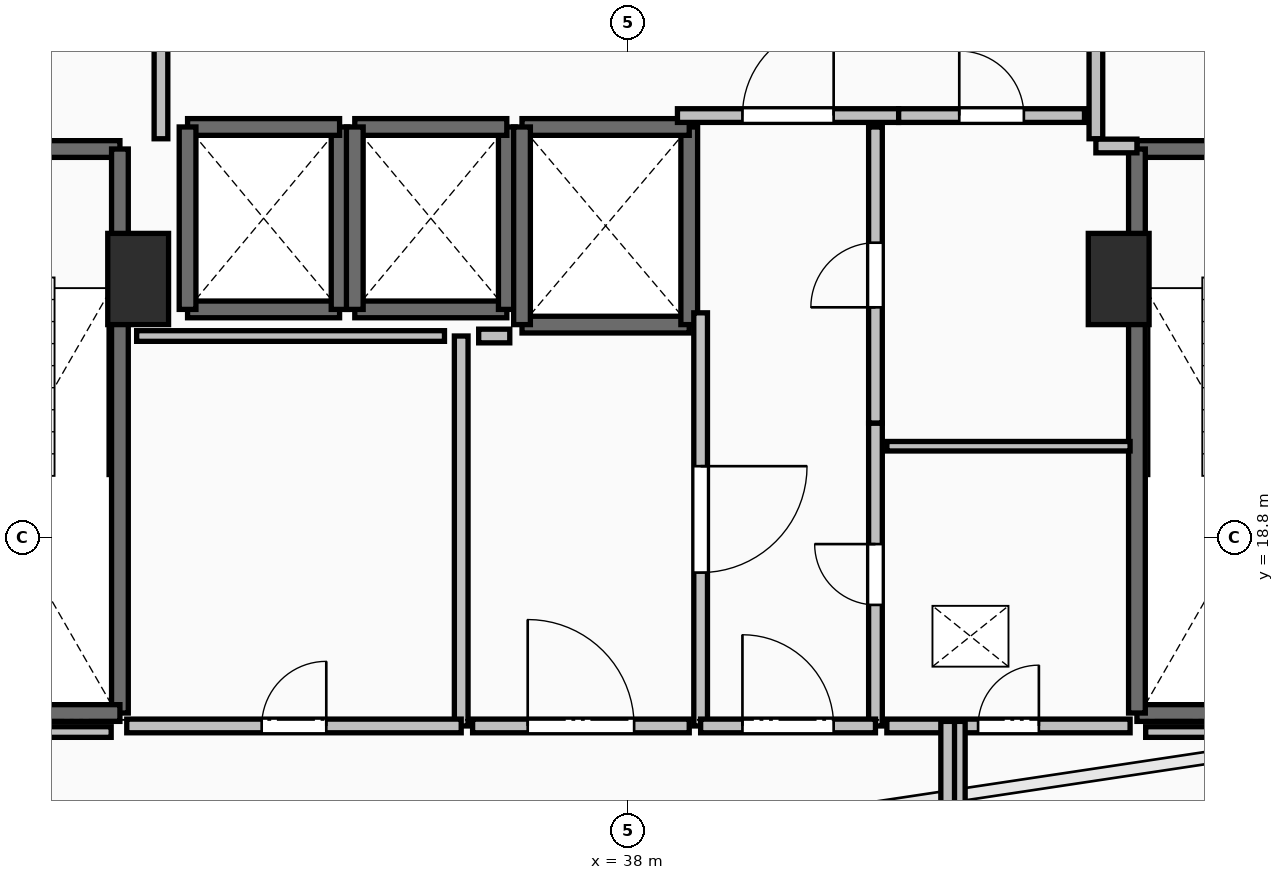
"""IFC4 building model, lengths in metres.
Left out: names, types, materials, properties, quantities, classifications, styles, units other than length and angle.
Written with IfcOpenShell. Run it as: python <this file> out.ifc"""

import sys

from ifc_helpers import new_model, si_unit, direction, frame, frame_2d, origin, origin_2d, place, context, subcontext, project, spatial, rectangle, extrude, element, fill, save


model = new_model("IFC4")
c1 = context("Model", 3, precision=1e-05, world=origin(), true_north=direction((0.0, 1.0)))
c2 = subcontext(c1, "Body", "Model", "MODEL_VIEW")
j1 = project(units=[si_unit("LENGTHUNIT", "METRE"), si_unit("PLANEANGLEUNIT", "RADIAN")], contexts=[c1])
p1 = place(None, origin())
s1 = spatial("IfcSite", under=j1, at=p1, CompositionType="ELEMENT")
p2 = place(p1, origin())
s2 = spatial("IfcBuilding", under=s1, at=p2, CompositionType="ELEMENT")
p3 = place(p2, frame((0.0, 0.0, 110.3)))
s3 = spatial("IfcBuildingStorey", under=s2, at=p3, CompositionType="ELEMENT", Elevation=110.3)
for number, where, z_axis, x_axis in (
    (1, (31.55, 22.2, 0.0), (0.0, 0.0, 1.0), (1.0, 0.0, 0.0)),
    (2, (44.45, 22.2, 0.0), (0.0, 0.0, 1.0), (1.0, 0.0, 0.0)),
):
    element("IfcColumn", number, at=place(p3, frame(where, z_axis=z_axis, x_axis=x_axis)), inside=s3, PredefinedType="PILASTER", context=c2, shape_type="SweptSolid", body=[
        extrude(rectangle(XDim=0.8, YDim=1.2, at=origin_2d()), origin(), (0.0, 0.0, 1.0), 3.5),
    ])
p4 = place(p3, frame((27.94, 23.91, 0.0), z_axis=(0.0, 0.0, 1.0), x_axis=(1.0, 0.0, 0.0)))
e3 = element("IfcWall", 3, at=p4, inside=s3, PredefinedType="SOLIDWALL", context=c2, shape_type="SweptSolid", body=[
    extrude(rectangle(XDim=3.37, YDim=0.22, at=frame_2d((1.685, 0.0))), origin(), (0.0, 0.0, 1.0), 3.24),
])
p5 = place(p4, frame((1.135, 0.0, 0.0)))
e4 = element("IfcOpeningElement", 4, at=p5, cuts=e3, PredefinedType="OPENING", context=c2, shape_type="SweptSolid", body=[
    extrude(rectangle(XDim=1.1, YDim=2.15, at=frame_2d((0.55, 1.075))), frame((0.0, 0.125, 0.0), z_axis=(0.0, -1.0, 0.0), x_axis=(1.0, 0.0, 0.0)), (0.0, 0.0, 1.0), 0.25),
])
p6 = place(p3, frame((31.31, 23.91, 0.0), z_axis=(0.0, 0.0, 1.0), x_axis=(0.0, -1.0, 0.0)))
e5 = element("IfcWall", 5, at=p6, inside=s3, PredefinedType="SOLIDWALL", context=c2, shape_type="SweptSolid", body=[
    extrude(rectangle(XDim=7.42, YDim=0.22, at=frame_2d((3.71, 0.0))), origin(), (0.0, 0.0, 1.0), 3.24),
])
p7 = place(p3, frame((31.31, 16.49, 0.0), z_axis=(0.0, 0.0, 1.0), x_axis=(-1.0, 0.0, 0.0)))
e6 = element("IfcWall", 6, at=p7, inside=s3, PredefinedType="SOLIDWALL", context=c2, shape_type="SweptSolid", body=[
    extrude(rectangle(XDim=3.37, YDim=0.22, at=frame_2d((1.685, 0.0))), origin(), (0.0, 0.0, 1.0), 3.24),
])
p8 = place(p3, frame((44.69, 23.91, 0.0), z_axis=(0.0, 0.0, 1.0), x_axis=(1.0, 0.0, 0.0)))
e7 = element("IfcWall", 7, at=p8, inside=s3, PredefinedType="SOLIDWALL", context=c2, shape_type="SweptSolid", body=[
    extrude(rectangle(XDim=3.37, YDim=0.22, at=frame_2d((1.685, 0.0))), origin(), (0.0, 0.0, 1.0), 3.24),
])
p9 = place(p8, frame((1.135, 0.0, 0.0)))
e8 = element("IfcOpeningElement", 8, at=p9, cuts=e7, PredefinedType="OPENING", context=c2, shape_type="SweptSolid", body=[
    extrude(rectangle(XDim=1.1, YDim=2.15, at=frame_2d((0.55, 1.075))), frame((0.0, 0.125, 0.0), z_axis=(0.0, -1.0, 0.0), x_axis=(1.0, 0.0, 0.0)), (0.0, 0.0, 1.0), 0.25),
])
p10 = place(p3, frame((48.06, 16.49, 0.0), z_axis=(0.0, 0.0, 1.0), x_axis=(-1.0, 0.0, 0.0)))
e9 = element("IfcWall", 9, at=p10, inside=s3, PredefinedType="SOLIDWALL", context=c2, shape_type="SweptSolid", body=[
    extrude(rectangle(XDim=3.37, YDim=0.22, at=frame_2d((1.685, 0.0))), origin(), (0.0, 0.0, 1.0), 3.24),
])
p11 = place(p3, frame((44.69, 16.49, 0.0), z_axis=(0.0, 0.0, 1.0), x_axis=(0.0, 1.0, 0.0)))
e10 = element("IfcWall", 10, at=p11, inside=s3, PredefinedType="SOLIDWALL", context=c2, shape_type="SweptSolid", body=[
    extrude(rectangle(XDim=7.42, YDim=0.22, at=frame_2d((3.71, 0.0))), origin(), (0.0, 0.0, 1.0), 3.24),
])
p12 = place(p3, frame((32.2, 21.8, 0.0), z_axis=(0.0, 0.0, 1.0), x_axis=(1.0, 0.0, 0.0)))
e11 = element("IfcWall", 11, at=p12, inside=s3, PredefinedType="SOLIDWALL", context=c2, shape_type="SweptSolid", body=[
    extrude(rectangle(XDim=2.0, YDim=0.22, at=frame_2d((1.0, 0.0))), origin(), (0.0, 0.0, 1.0), 3.24),
])
p13 = place(p3, frame((34.2, 21.8, 0.0), z_axis=(0.0, 0.0, 1.0), x_axis=(0.0, 1.0, 0.0)))
e12 = element("IfcWall", 12, at=p13, inside=s3, PredefinedType="SOLIDWALL", context=c2, shape_type="SweptSolid", body=[
    extrude(rectangle(XDim=2.4, YDim=0.22, at=frame_2d((1.2, 0.0))), origin(), (0.0, 0.0, 1.0), 3.24),
])
p14 = place(p3, frame((34.2, 24.2, 0.0), z_axis=(0.0, 0.0, 1.0), x_axis=(-1.0, 0.0, 0.0)))
e13 = element("IfcWall", 13, at=p14, inside=s3, PredefinedType="SOLIDWALL", context=c2, shape_type="SweptSolid", body=[
    extrude(rectangle(XDim=2.0, YDim=0.22, at=frame_2d((1.0, 0.0))), origin(), (0.0, 0.0, 1.0), 3.24),
])
p15 = place(p3, frame((32.2, 24.2, 0.0), z_axis=(0.0, 0.0, 1.0), x_axis=(0.0, -1.0, 0.0)))
e14 = element("IfcWall", 14, at=p15, inside=s3, PredefinedType="SOLIDWALL", context=c2, shape_type="SweptSolid", body=[
    extrude(rectangle(XDim=2.4, YDim=0.22, at=frame_2d((1.2, 0.0))), origin(), (0.0, 0.0, 1.0), 3.24),
])
p16 = place(p3, frame((34.4, 21.8, 0.0), z_axis=(0.0, 0.0, 1.0), x_axis=(1.0, 0.0, 0.0)))
e15 = element("IfcWall", 15, at=p16, inside=s3, PredefinedType="SOLIDWALL", context=c2, shape_type="SweptSolid", body=[
    extrude(rectangle(XDim=2.0, YDim=0.22, at=frame_2d((1.0, 0.0))), origin(), (0.0, 0.0, 1.0), 3.24),
])
p17 = place(p3, frame((36.4, 21.8, 0.0), z_axis=(0.0, 0.0, 1.0), x_axis=(0.0, 1.0, 0.0)))
e16 = element("IfcWall", 16, at=p17, inside=s3, PredefinedType="SOLIDWALL", context=c2, shape_type="SweptSolid", body=[
    extrude(rectangle(XDim=2.4, YDim=0.22, at=frame_2d((1.2, 0.0))), origin(), (0.0, 0.0, 1.0), 3.24),
])
p18 = place(p3, frame((36.4, 24.2, 0.0), z_axis=(0.0, 0.0, 1.0), x_axis=(-1.0, 0.0, 0.0)))
e17 = element("IfcWall", 17, at=p18, inside=s3, PredefinedType="SOLIDWALL", context=c2, shape_type="SweptSolid", body=[
    extrude(rectangle(XDim=2.0, YDim=0.22, at=frame_2d((1.0, 0.0))), origin(), (0.0, 0.0, 1.0), 3.24),
])
p19 = place(p3, frame((34.4, 24.2, 0.0), z_axis=(0.0, 0.0, 1.0), x_axis=(0.0, -1.0, 0.0)))
e18 = element("IfcWall", 18, at=p19, inside=s3, PredefinedType="SOLIDWALL", context=c2, shape_type="SweptSolid", body=[
    extrude(rectangle(XDim=2.4, YDim=0.22, at=frame_2d((1.2, 0.0))), origin(), (0.0, 0.0, 1.0), 3.24),
])
p20 = place(p3, frame((36.6, 21.6, 0.0), z_axis=(0.0, 0.0, 1.0), x_axis=(1.0, 0.0, 0.0)))
e19 = element("IfcWall", 19, at=p20, inside=s3, PredefinedType="SOLIDWALL", context=c2, shape_type="SweptSolid", body=[
    extrude(rectangle(XDim=2.2, YDim=0.22, at=frame_2d((1.1, 0.0))), origin(), (0.0, 0.0, 1.0), 3.24),
])
p21 = place(p3, frame((38.8, 21.6, 0.0), z_axis=(0.0, 0.0, 1.0), x_axis=(0.0, 1.0, 0.0)))
e20 = element("IfcWall", 20, at=p21, inside=s3, PredefinedType="SOLIDWALL", context=c2, shape_type="SweptSolid", body=[
    extrude(rectangle(XDim=2.6, YDim=0.22, at=frame_2d((1.3, 0.0))), origin(), (0.0, 0.0, 1.0), 3.24),
])
p22 = place(p3, frame((38.8, 24.2, 0.0), z_axis=(0.0, 0.0, 1.0), x_axis=(-1.0, 0.0, 0.0)))
e21 = element("IfcWall", 21, at=p22, inside=s3, PredefinedType="SOLIDWALL", context=c2, shape_type="SweptSolid", body=[
    extrude(rectangle(XDim=2.2, YDim=0.22, at=frame_2d((1.1, 0.0))), origin(), (0.0, 0.0, 1.0), 3.24),
])
p23 = place(p3, frame((36.6, 24.2, 0.0), z_axis=(0.0, 0.0, 1.0), x_axis=(0.0, -1.0, 0.0)))
e22 = element("IfcWall", 22, at=p23, inside=s3, PredefinedType="SOLIDWALL", context=c2, shape_type="SweptSolid", body=[
    extrude(rectangle(XDim=2.6, YDim=0.22, at=frame_2d((1.3, 0.0))), origin(), (0.0, 0.0, 1.0), 3.24),
])
p24 = place(p3, frame((31.85, 24.045, 0.0), z_axis=(0.0, 0.0, 1.0), x_axis=(0.0, 1.0, 0.0)))
e23 = element("IfcWall", 23, at=p24, inside=s3, PredefinedType="PARTITIONING", context=c2, shape_type="SweptSolid", body=[
    extrude(rectangle(XDim=3.91, YDim=0.18, at=frame_2d((1.955, 0.0))), origin(), (0.0, 0.0, 1.0), 3.24),
])
p25 = place(p24, frame((1.355, 0.0, 0.0)))
e24 = element("IfcOpeningElement", 24, at=p25, cuts=e23, PredefinedType="OPENING", context=c2, shape_type="SweptSolid", body=[
    extrude(rectangle(XDim=1.2, YDim=2.15, at=frame_2d((0.6, 1.075))), frame((0.0, 0.105, 0.0), z_axis=(0.0, -1.0, 0.0), x_axis=(1.0, 0.0, 0.0)), (0.0, 0.0, 1.0), 0.21),
])
p26 = place(p3, frame((44.15, 27.955, 0.0), z_axis=(0.0, 0.0, 1.0), x_axis=(0.0, -1.0, 0.0)))
e25 = element("IfcWall", 25, at=p26, inside=s3, PredefinedType="PARTITIONING", context=c2, shape_type="SweptSolid", body=[
    extrude(rectangle(XDim=3.91, YDim=0.18, at=frame_2d((1.955, 0.0))), origin(), (0.0, 0.0, 1.0), 3.24),
])
p27 = place(p26, frame((1.355, 0.0, 0.0)))
e26 = element("IfcOpeningElement", 26, at=p27, cuts=e25, PredefinedType="OPENING", context=c2, shape_type="SweptSolid", body=[
    extrude(rectangle(XDim=1.2, YDim=2.15, at=frame_2d((0.6, 1.075))), frame((0.0, 0.105, 0.0), z_axis=(0.0, -1.0, 0.0), x_axis=(1.0, 0.0, 0.0)), (0.0, 0.0, 1.0), 0.21),
])
p28 = place(p3, frame((44.15, 23.95, 0.0), z_axis=(0.0, 0.0, 1.0), x_axis=(1.0, 0.0, 0.0)))
e27 = element("IfcWall", 27, at=p28, inside=s3, PredefinedType="PARTITIONING", context=c2, shape_type="SweptSolid", body=[
    extrude(rectangle(XDim=0.54, YDim=0.18, at=frame_2d((0.27, 0.0))), origin(), (0.0, 0.0, 1.0), 3.24),
])
p29 = place(p3, frame((38.645, 24.35, 0.0), z_axis=(0.0, 0.0, 1.0), x_axis=(1.0, 0.0, 0.0)))
e28 = element("IfcWall", 28, at=p29, inside=s3, PredefinedType="PARTITIONING", context=c2, shape_type="SweptSolid", body=[
    extrude(rectangle(XDim=2.91, YDim=0.18, at=frame_2d((1.455, 0.0))), origin(), (0.0, 0.0, 1.0), 3.24),
])
p30 = place(p29, frame((0.855, 0.0, 0.0)))
e29 = element("IfcOpeningElement", 29, at=p30, cuts=e28, PredefinedType="OPENING", context=c2, shape_type="SweptSolid", body=[
    extrude(rectangle(XDim=1.2, YDim=2.15, at=frame_2d((0.6, 1.075))), frame((0.0, 0.105, 0.0), z_axis=(0.0, -1.0, 0.0), x_axis=(1.0, 0.0, 0.0)), (0.0, 0.0, 1.0), 0.21),
])
p31 = place(p3, frame((41.555, 24.35, 0.0), z_axis=(0.0, 0.0, 1.0), x_axis=(1.0, 0.0, 0.0)))
e30 = element("IfcWall", 30, at=p31, inside=s3, PredefinedType="PARTITIONING", context=c2, shape_type="SweptSolid", body=[
    extrude(rectangle(XDim=2.445, YDim=0.18, at=frame_2d((1.223, 0.0))), origin(), (0.0, 0.0, 1.0), 3.24),
])
p32 = place(p31, frame((0.798, 0.0, 0.0)))
e31 = element("IfcOpeningElement", 31, at=p32, cuts=e30, PredefinedType="OPENING", context=c2, shape_type="SweptSolid", body=[
    extrude(rectangle(XDim=0.85, YDim=2.1, at=frame_2d((0.425, 1.05))), frame((0.0, 0.105, 0.0), z_axis=(0.0, -1.0, 0.0), x_axis=(1.0, 0.0, 0.0)), (0.0, 0.0, 1.0), 0.21),
])
p33 = place(p3, frame((41.25, 16.32, 0.0), z_axis=(0.0, 0.0, 1.0), x_axis=(0.0, 1.0, 0.0)))
e32 = element("IfcWall", 32, at=p33, inside=s3, PredefinedType="PARTITIONING", context=c2, shape_type="SweptSolid", body=[
    extrude(rectangle(XDim=3.985, YDim=0.18, at=frame_2d((1.992, 0.0))), origin(), (0.0, 0.0, 1.0), 3.24),
])
p34 = place(p33, frame((1.593, 0.0, 0.0)))
e33 = element("IfcOpeningElement", 33, at=p34, cuts=e32, PredefinedType="OPENING", context=c2, shape_type="SweptSolid", body=[
    extrude(rectangle(XDim=0.8, YDim=2.05, at=frame_2d((0.4, 1.025))), frame((0.0, 0.105, 0.0), z_axis=(0.0, -1.0, 0.0), x_axis=(1.0, 0.0, 0.0)), (0.0, 0.0, 1.0), 0.21),
])
p35 = place(p3, frame((41.25, 20.305, 0.0), z_axis=(0.0, 0.0, 1.0), x_axis=(0.0, 1.0, 0.0)))
e34 = element("IfcWall", 34, at=p35, inside=s3, PredefinedType="PARTITIONING", context=c2, shape_type="SweptSolid", body=[
    extrude(rectangle(XDim=3.895, YDim=0.18, at=frame_2d((1.948, 0.0))), origin(), (0.0, 0.0, 1.0), 3.24),
])
p36 = place(p35, frame((1.522, 0.0, 0.0)))
e35 = element("IfcOpeningElement", 35, at=p36, cuts=e34, PredefinedType="OPENING", context=c2, shape_type="SweptSolid", body=[
    extrude(rectangle(XDim=0.85, YDim=2.1, at=frame_2d((0.425, 1.05))), frame((0.0, 0.105, 0.0), z_axis=(0.0, -1.0, 0.0), x_axis=(1.0, 0.0, 0.0)), (0.0, 0.0, 1.0), 0.21),
])
p37 = place(p3, frame((38.95, 21.755, 0.0), z_axis=(0.0, 0.0, 1.0), x_axis=(0.0, -1.0, 0.0)))
e36 = element("IfcWall", 36, at=p37, inside=s3, PredefinedType="PARTITIONING", context=c2, shape_type="SweptSolid", body=[
    extrude(rectangle(XDim=5.435, YDim=0.18, at=frame_2d((2.717, 0.0))), origin(), (0.0, 0.0, 1.0), 3.24),
])
p38 = place(p37, frame((2.018, 0.0, 0.0)))
e37 = element("IfcOpeningElement", 37, at=p38, cuts=e36, PredefinedType="OPENING", context=c2, shape_type="SweptSolid", body=[
    extrude(rectangle(XDim=1.4, YDim=2.2, at=frame_2d((0.7, 1.1))), frame((0.0, 0.105, 0.0), z_axis=(0.0, -1.0, 0.0), x_axis=(1.0, 0.0, 0.0)), (0.0, 0.0, 1.0), 0.21),
])
p39 = place(p3, frame((38.95, 16.32, 0.0), z_axis=(0.0, 0.0, 1.0), x_axis=(1.0, 0.0, 0.0)))
e38 = element("IfcWall", 38, at=p39, inside=s3, PredefinedType="PARTITIONING", context=c2, shape_type="SweptSolid", body=[
    extrude(rectangle(XDim=2.3, YDim=0.18, at=frame_2d((1.15, 0.0))), origin(), (0.0, 0.0, 1.0), 3.24),
])
p40 = place(p39, frame((0.55, 0.0, 0.0)))
e39 = element("IfcOpeningElement", 39, at=p40, cuts=e38, PredefinedType="OPENING", context=c2, shape_type="SweptSolid", body=[
    extrude(rectangle(XDim=1.2, YDim=2.15, at=frame_2d((0.6, 1.075))), frame((0.0, 0.105, 0.0), z_axis=(0.0, -1.0, 0.0), x_axis=(1.0, 0.0, 0.0)), (0.0, 0.0, 1.0), 0.21),
])
p41 = place(p3, frame((44.6, 20.0, 0.0), z_axis=(0.0, 0.0, 1.0), x_axis=(-1.0, 0.0, 0.0)))
e40 = element("IfcWall", 40, at=p41, inside=s3, PredefinedType="PARTITIONING", context=c2, shape_type="SweptSolid", body=[
    extrude(rectangle(XDim=3.2, YDim=0.125, at=frame_2d((1.6, 0.0))), origin(), (0.0, 0.0, 1.0), 3.24),
])
p42 = place(p3, frame((41.4, 16.32, 0.0), z_axis=(0.0, 0.0, 1.0), x_axis=(1.0, 0.0, 0.0)))
e41 = element("IfcWall", 41, at=p42, inside=s3, PredefinedType="PARTITIONING", context=c2, shape_type="SweptSolid", body=[
    extrude(rectangle(XDim=3.2, YDim=0.18, at=frame_2d((1.6, 0.0))), origin(), (0.0, 0.0, 1.0), 3.24),
])
p43 = place(p42, frame((1.2, 0.0, 0.0)))
e42 = element("IfcOpeningElement", 42, at=p43, cuts=e41, PredefinedType="OPENING", context=c2, shape_type="SweptSolid", body=[
    extrude(rectangle(XDim=0.8, YDim=2.05, at=frame_2d((0.4, 1.025))), frame((0.0, 0.105, 0.0), z_axis=(0.0, -1.0, 0.0), x_axis=(1.0, 0.0, 0.0)), (0.0, 0.0, 1.0), 0.21),
])
p44 = place(p3, frame((35.8, 16.32, 0.0), z_axis=(0.0, 0.0, 1.0), x_axis=(0.0, 1.0, 0.0)))
e43 = element("IfcWall", 43, at=p44, inside=s3, PredefinedType="PARTITIONING", context=c2, shape_type="SweptSolid", body=[
    extrude(rectangle(XDim=5.13, YDim=0.18, at=frame_2d((2.565, 0.0))), origin(), (0.0, 0.0, 1.0), 3.24),
])
p45 = place(p3, frame((31.4, 16.32, 0.0), z_axis=(0.0, 0.0, 1.0), x_axis=(1.0, 0.0, 0.0)))
e44 = element("IfcWall", 44, at=p45, inside=s3, PredefinedType="PARTITIONING", context=c2, shape_type="SweptSolid", body=[
    extrude(rectangle(XDim=4.4, YDim=0.18, at=frame_2d((2.2, 0.0))), origin(), (0.0, 0.0, 1.0), 3.24),
])
p46 = place(p45, frame((1.775, 0.0, 0.0)))
e45 = element("IfcOpeningElement", 45, at=p46, cuts=e44, PredefinedType="OPENING", context=c2, shape_type="SweptSolid", body=[
    extrude(rectangle(XDim=0.85, YDim=2.1, at=frame_2d((0.425, 1.05))), frame((0.0, 0.105, 0.0), z_axis=(0.0, -1.0, 0.0), x_axis=(1.0, 0.0, 0.0)), (0.0, 0.0, 1.0), 0.21),
])
p47 = place(p3, frame((35.95, 16.32, 0.0), z_axis=(0.0, 0.0, 1.0), x_axis=(1.0, 0.0, 0.0)))
e46 = element("IfcWall", 46, at=p47, inside=s3, PredefinedType="PARTITIONING", context=c2, shape_type="SweptSolid", body=[
    extrude(rectangle(XDim=2.85, YDim=0.18, at=frame_2d((1.425, 0.0))), origin(), (0.0, 0.0, 1.0), 3.24),
])
p48 = place(p47, frame((0.725, 0.0, 0.0)))
e47 = element("IfcOpeningElement", 47, at=p48, cuts=e46, PredefinedType="OPENING", context=c2, shape_type="SweptSolid", body=[
    extrude(rectangle(XDim=1.4, YDim=2.2, at=frame_2d((0.7, 1.1))), frame((0.0, 0.105, 0.0), z_axis=(0.0, -1.0, 0.0), x_axis=(1.0, 0.0, 0.0)), (0.0, 0.0, 1.0), 0.21),
])
for number, where, z_axis, x_axis in (
    (48, (42.34, 16.38, 0.0), (0.0, 0.0, 1.0), (0.0, -1.0, 0.0)),
    (49, (42.2, 13.96, 0.0), (0.0, 0.0, 1.0), (0.0, 1.0, 0.0)),
):
    element("IfcWall", number, at=place(p3, frame(where, z_axis=z_axis, x_axis=x_axis)), inside=s3, PredefinedType="PARTITIONING", context=c2, shape_type="SweptSolid", body=[
        extrude(rectangle(XDim=2.42, YDim=0.18, at=frame_2d((1.21, 0.0))), origin(), (0.0, 0.0, 1.0), 2.929),
    ])
p49 = place(p3, frame((35.58, 21.45, 0.0), z_axis=(0.0, 0.0, 1.0), x_axis=(-1.0, 0.0, 0.0)))
e50 = element("IfcWall", 50, at=p49, inside=s3, PredefinedType="PARTITIONING", context=c2, shape_type="SweptSolid", body=[
    extrude(rectangle(XDim=4.05, YDim=0.14, at=frame_2d((2.025, 0.0))), origin(), (0.0, 0.0, 1.0), 3.24),
])
p50 = place(p3, frame((36.439, 21.45, 0.0), z_axis=(0.0, 0.0, 1.0), x_axis=(-1.0, 0.0, 0.0)))
e51 = element("IfcWall", 51, at=p50, inside=s3, PredefinedType="PARTITIONING", context=c2, shape_type="SweptSolid", body=[
    extrude(rectangle(XDim=0.409, YDim=0.18, at=frame_2d((0.205, 0.0))), origin(), (0.0, 0.0, 1.0), 3.24),
])
for number, where, z_axis, x_axis in (
    (52, (48.55, 16.24, 0.0), (0.0, 0.0, 1.0), (-1.0, 0.0, 0.0)),
    (53, (31.195, 16.24, 0.0), (0.0, 0.0, 1.0), (-1.0, 0.0, 0.0)),
):
    element("IfcWall", number, at=place(p3, frame(where, z_axis=z_axis, x_axis=x_axis)), inside=s3, PredefinedType="PARTITIONING", context=c2, shape_type="SweptSolid", body=[
        extrude(rectangle(XDim=3.745, YDim=0.14, at=frame_2d((1.873, 0.0))), origin(), (0.0, 0.0, 1.0), 2.432),
    ])
p51 = place(p30, origin())
e54 = element("IfcDoor", 54, at=p51, inside=s3, OperationType="SINGLE_SWING_RIGHT", PredefinedType="DOOR", context=c2, shape_type="SweptSolid", body=[
    extrude(rectangle(XDim=1.2, YDim=2.15, at=frame_2d((0.6, 1.075))), frame((0.0, 0.025, 0.0), z_axis=(0.0, -1.0, 0.0), x_axis=(1.0, 0.0, 0.0)), (0.0, 0.0, 1.0), 0.05),
])
fill(e29, e54)
p52 = place(p32, origin())
e55 = element("IfcDoor", 55, at=p52, inside=s3, OperationType="SINGLE_SWING_LEFT", PredefinedType="DOOR", context=c2, shape_type="SweptSolid", body=[
    extrude(rectangle(XDim=0.85, YDim=2.1, at=frame_2d((0.425, 1.05))), frame((0.0, 0.025, 0.0), z_axis=(0.0, -1.0, 0.0), x_axis=(1.0, 0.0, 0.0)), (0.0, 0.0, 1.0), 0.05),
])
fill(e31, e55)
p53 = place(p34, origin())
e56 = element("IfcDoor", 56, at=p53, inside=s3, OperationType="SINGLE_SWING_RIGHT", PredefinedType="DOOR", context=c2, shape_type="SweptSolid", body=[
    extrude(rectangle(XDim=0.8, YDim=2.05, at=frame_2d((0.4, 1.025))), frame((0.0, 0.025, 0.0), z_axis=(0.0, -1.0, 0.0), x_axis=(1.0, 0.0, 0.0)), (0.0, 0.0, 1.0), 0.05),
])
fill(e33, e56)
p54 = place(p36, origin())
e57 = element("IfcDoor", 57, at=p54, inside=s3, OperationType="SINGLE_SWING_LEFT", PredefinedType="DOOR", context=c2, shape_type="SweptSolid", body=[
    extrude(rectangle(XDim=0.85, YDim=2.1, at=frame_2d((0.425, 1.05))), frame((0.0, 0.025, 0.0), z_axis=(0.0, -1.0, 0.0), x_axis=(1.0, 0.0, 0.0)), (0.0, 0.0, 1.0), 0.05),
])
fill(e35, e57)
p55 = place(p38, origin())
e58 = element("IfcDoor", 58, at=p55, inside=s3, OperationType="DOUBLE_SWING_LEFT", PredefinedType="DOOR", context=c2, shape_type="SweptSolid", body=[
    extrude(rectangle(XDim=1.4, YDim=2.2, at=frame_2d((0.7, 1.1))), frame((0.0, 0.025, 0.0), z_axis=(0.0, -1.0, 0.0), x_axis=(1.0, 0.0, 0.0)), (0.0, 0.0, 1.0), 0.05),
])
fill(e37, e58)
p56 = place(p40, origin())
e59 = element("IfcDoor", 59, at=p56, inside=s3, OperationType="SINGLE_SWING_LEFT", PredefinedType="DOOR", context=c2, shape_type="SweptSolid", body=[
    extrude(rectangle(XDim=1.2, YDim=2.15, at=frame_2d((0.6, 1.075))), frame((0.0, 0.025, 0.0), z_axis=(0.0, -1.0, 0.0), x_axis=(1.0, 0.0, 0.0)), (0.0, 0.0, 1.0), 0.05),
])
fill(e39, e59)
p57 = place(p43, origin())
e60 = element("IfcDoor", 60, at=p57, inside=s3, OperationType="SINGLE_SWING_RIGHT", PredefinedType="DOOR", context=c2, shape_type="SweptSolid", body=[
    extrude(rectangle(XDim=0.8, YDim=2.05, at=frame_2d((0.4, 1.025))), frame((0.0, 0.025, 0.0), z_axis=(0.0, -1.0, 0.0), x_axis=(1.0, 0.0, 0.0)), (0.0, 0.0, 1.0), 0.05),
])
fill(e42, e60)
p58 = place(p46, origin())
e61 = element("IfcDoor", 61, at=p58, inside=s3, OperationType="SINGLE_SWING_RIGHT", PredefinedType="DOOR", context=c2, shape_type="SweptSolid", body=[
    extrude(rectangle(XDim=0.85, YDim=2.1, at=frame_2d((0.425, 1.05))), frame((0.0, 0.025, 0.0), z_axis=(0.0, -1.0, 0.0), x_axis=(1.0, 0.0, 0.0)), (0.0, 0.0, 1.0), 0.05),
])
fill(e45, e61)
p59 = place(p48, origin())
e62 = element("IfcDoor", 62, at=p59, inside=s3, OperationType="DOUBLE_SWING_LEFT", PredefinedType="DOOR", context=c2, shape_type="SweptSolid", body=[
    extrude(rectangle(XDim=1.4, YDim=2.2, at=frame_2d((0.7, 1.1))), frame((0.0, 0.025, 0.0), z_axis=(0.0, -1.0, 0.0), x_axis=(1.0, 0.0, 0.0)), (0.0, 0.0, 1.0), 0.05),
])
fill(e47, e62)
save(model, sys.argv[1])
